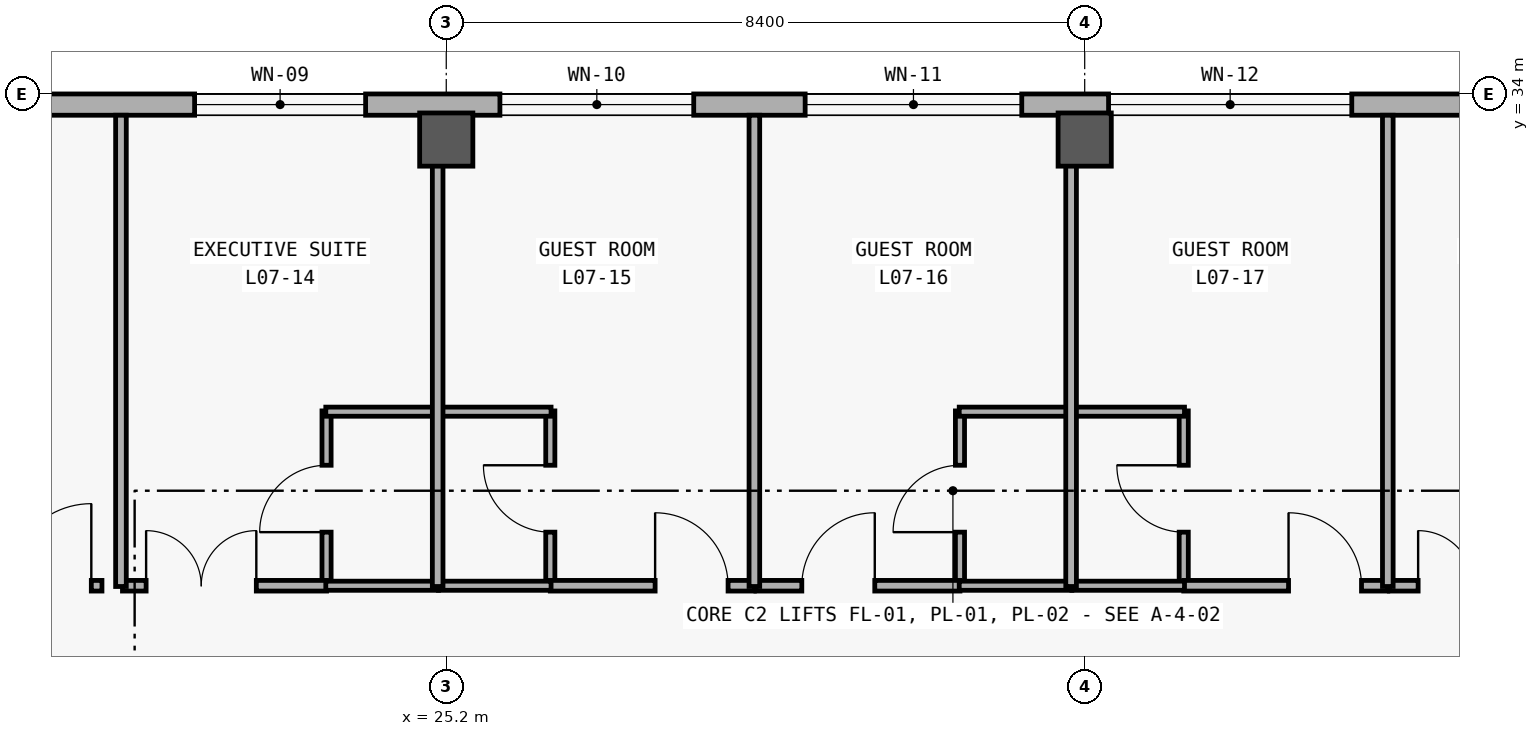
"""IFC4 building model, lengths in metres.
Left out: names, types, materials, properties, quantities, classifications, styles, units other than length and angle.
Written with IfcOpenShell. Run it as: python <this file> out.ifc"""

import sys

from ifc_helpers import new_model, si_unit, direction, frame, frame_2d, origin, origin_2d, place, context, subcontext, project, spatial, rectangle, extrude, element, fill, save


model = new_model("IFC4")
c1 = context("Model", 3, precision=1e-05, world=origin(), true_north=direction((0.0, 1.0)))
c2 = subcontext(c1, "Body", "Model", "MODEL_VIEW")
j1 = project(units=[si_unit("LENGTHUNIT", "METRE"), si_unit("PLANEANGLEUNIT", "RADIAN")], contexts=[c1])
p1 = place(None, origin())
s1 = spatial("IfcSite", under=j1, at=p1, CompositionType="ELEMENT")
p2 = place(p1, origin())
s2 = spatial("IfcBuilding", under=s1, at=p2, CompositionType="ELEMENT")
p3 = place(p2, frame((0.0, 0.0, 30.0)))
s3 = spatial("IfcBuildingStorey", under=s2, at=p3, CompositionType="ELEMENT", Elevation=30.0)
for number, where, z_axis, x_axis in (
    (1, (25.2, 33.4, 0.0), (0.0, 0.0, 1.0), (1.0, 0.0, 0.0)),
    (2, (33.6, 33.4, 0.0), (0.0, 0.0, 1.0), (1.0, 0.0, 0.0)),
):
    element("IfcColumn", number, at=place(p3, frame(where, z_axis=z_axis, x_axis=x_axis)), inside=s3, PredefinedType="COLUMN", context=c2, shape_type="SweptSolid", body=[
        extrude(rectangle(XDim=0.7, YDim=0.7, at=origin_2d()), origin(), (0.0, 0.0, 1.0), 3.6),
    ])
p4 = place(p3, frame((8.68, 33.86, 0.0), z_axis=(0.0, 0.0, 1.0), x_axis=(1.0, 0.0, 0.0)))
e3 = element("IfcWall", 3, at=p4, inside=s3, PredefinedType="SOLIDWALL", context=c2, shape_type="SweptSolid", body=[
    extrude(rectangle(XDim=66.64, YDim=0.28, at=frame_2d((33.32, 0.0))), origin(), (0.0, 0.0, 1.0), 3.34),
])
p5 = place(p4, frame((5.195, 0.0, 0.85)))
e4 = element("IfcOpeningElement", 4, at=p5, cuts=e3, PredefinedType="OPENING", context=c2, shape_type="SweptSolid", body=[
    extrude(rectangle(XDim=2.0, YDim=1.65, at=frame_2d((1.0, 0.825))), frame((0.0, 0.15, 0.0), z_axis=(0.0, -1.0, 0.0), x_axis=(1.0, 0.0, 0.0)), (0.0, 0.0, 1.0), 0.3),
])
p6 = place(p4, frame((13.209, 0.0, 0.85)))
e5 = element("IfcOpeningElement", 5, at=p6, cuts=e3, PredefinedType="OPENING", context=c2, shape_type="SweptSolid", body=[
    extrude(rectangle(XDim=2.25, YDim=1.75, at=frame_2d((1.125, 0.875))), frame((0.0, 0.15, 0.0), z_axis=(0.0, -1.0, 0.0), x_axis=(1.0, 0.0, 0.0)), (0.0, 0.0, 1.0), 0.3),
])
p7 = place(p4, frame((17.226, 0.0, 0.85)))
e6 = element("IfcOpeningElement", 6, at=p7, cuts=e3, PredefinedType="OPENING", context=c2, shape_type="SweptSolid", body=[
    extrude(rectangle(XDim=2.55, YDim=1.8, at=frame_2d((1.275, 0.9))), frame((0.0, 0.15, 0.0), z_axis=(0.0, -1.0, 0.0), x_axis=(1.0, 0.0, 0.0)), (0.0, 0.0, 1.0), 0.3),
])
p8 = place(p4, frame((21.242, 0.0, 0.85)))
e7 = element("IfcOpeningElement", 7, at=p8, cuts=e3, PredefinedType="OPENING", context=c2, shape_type="SweptSolid", body=[
    extrude(rectangle(XDim=2.85, YDim=1.85, at=frame_2d((1.425, 0.925))), frame((0.0, 0.15, 0.0), z_axis=(0.0, -1.0, 0.0), x_axis=(1.0, 0.0, 0.0)), (0.0, 0.0, 1.0), 0.3),
])
p9 = place(p4, frame((25.234, 0.0, 0.85)))
e8 = element("IfcOpeningElement", 8, at=p9, cuts=e3, PredefinedType="OPENING", context=c2, shape_type="SweptSolid", body=[
    extrude(rectangle(XDim=3.2, YDim=1.95, at=frame_2d((1.6, 0.975))), frame((0.0, 0.15, 0.0), z_axis=(0.0, -1.0, 0.0), x_axis=(1.0, 0.0, 0.0)), (0.0, 0.0, 1.0), 0.3),
])
p10 = place(p4, frame((30.302, 0.0, 0.85)))
e9 = element("IfcOpeningElement", 9, at=p10, cuts=e3, PredefinedType="OPENING", context=c2, shape_type="SweptSolid", body=[
    extrude(rectangle(XDim=1.4, YDim=1.6, at=frame_2d((0.7, 0.8))), frame((0.0, 0.15, 0.0), z_axis=(0.0, -1.0, 0.0), x_axis=(1.0, 0.0, 0.0)), (0.0, 0.0, 1.0), 0.3),
])
p11 = place(p4, frame((34.369, 0.0, 0.85)))
e10 = element("IfcOpeningElement", 10, at=p11, cuts=e3, PredefinedType="OPENING", context=c2, shape_type="SweptSolid", body=[
    extrude(rectangle(XDim=1.6, YDim=1.6, at=frame_2d((0.8, 0.8))), frame((0.0, 0.15, 0.0), z_axis=(0.0, -1.0, 0.0), x_axis=(1.0, 0.0, 0.0)), (0.0, 0.0, 1.0), 0.3),
])
p12 = place(p4, frame((38.435, 0.0, 0.85)))
e11 = element("IfcOpeningElement", 11, at=p12, cuts=e3, PredefinedType="OPENING", context=c2, shape_type="SweptSolid", body=[
    extrude(rectangle(XDim=1.8, YDim=1.6, at=frame_2d((0.9, 0.8))), frame((0.0, 0.15, 0.0), z_axis=(0.0, -1.0, 0.0), x_axis=(1.0, 0.0, 0.0)), (0.0, 0.0, 1.0), 0.3),
])
p13 = place(p4, frame((42.502, 0.0, 0.85)))
e12 = element("IfcOpeningElement", 12, at=p13, cuts=e3, PredefinedType="OPENING", context=c2, shape_type="SweptSolid", body=[
    extrude(rectangle(XDim=2.0, YDim=1.65, at=frame_2d((1.0, 0.825))), frame((0.0, 0.15, 0.0), z_axis=(0.0, -1.0, 0.0), x_axis=(1.0, 0.0, 0.0)), (0.0, 0.0, 1.0), 0.3),
])
p14 = place(p4, frame((46.569, 0.0, 0.85)))
e13 = element("IfcOpeningElement", 13, at=p14, cuts=e3, PredefinedType="OPENING", context=c2, shape_type="SweptSolid", body=[
    extrude(rectangle(XDim=2.2, YDim=1.65, at=frame_2d((1.1, 0.825))), frame((0.0, 0.15, 0.0), z_axis=(0.0, -1.0, 0.0), x_axis=(1.0, 0.0, 0.0)), (0.0, 0.0, 1.0), 0.3),
])
p15 = place(p4, frame((50.536, 0.0, 0.85)))
e14 = element("IfcOpeningElement", 14, at=p15, cuts=e3, PredefinedType="OPENING", context=c2, shape_type="SweptSolid", body=[
    extrude(rectangle(XDim=2.6, YDim=2.2, at=frame_2d((1.3, 1.1))), frame((0.0, 0.15, 0.0), z_axis=(0.0, -1.0, 0.0), x_axis=(1.0, 0.0, 0.0)), (0.0, 0.0, 1.0), 0.3),
])
p16 = place(p4, frame((54.453, 0.0, 0.85)))
e15 = element("IfcOpeningElement", 15, at=p16, cuts=e3, PredefinedType="OPENING", context=c2, shape_type="SweptSolid", body=[
    extrude(rectangle(XDim=3.1, YDim=2.2, at=frame_2d((1.55, 1.1))), frame((0.0, 0.15, 0.0), z_axis=(0.0, -1.0, 0.0), x_axis=(1.0, 0.0, 0.0)), (0.0, 0.0, 1.0), 0.3),
])
p17 = place(p4, frame((59.545, 0.0, 0.85)))
e16 = element("IfcOpeningElement", 16, at=p17, cuts=e3, PredefinedType="OPENING", context=c2, shape_type="SweptSolid", body=[
    extrude(rectangle(XDim=1.25, YDim=1.45, at=frame_2d((0.625, 0.725))), frame((0.0, 0.15, 0.0), z_axis=(0.0, -1.0, 0.0), x_axis=(1.0, 0.0, 0.0)), (0.0, 0.0, 1.0), 0.3),
])
p18 = place(p4, frame((63.662, 0.0, 0.85)))
e17 = element("IfcOpeningElement", 17, at=p18, cuts=e3, PredefinedType="OPENING", context=c2, shape_type="SweptSolid", body=[
    extrude(rectangle(XDim=1.35, YDim=1.55, at=frame_2d((0.675, 0.775))), frame((0.0, 0.15, 0.0), z_axis=(0.0, -1.0, 0.0), x_axis=(1.0, 0.0, 0.0)), (0.0, 0.0, 1.0), 0.3),
])
p19 = place(p3, frame((23.625, 27.52, 0.0), z_axis=(0.0, 0.0, 1.0), x_axis=(0.0, 1.0, 0.0)))
e18 = element("IfcWall", 18, at=p19, inside=s3, PredefinedType="PARTITIONING", context=c2, shape_type="SweptSolid", body=[
    extrude(rectangle(XDim=2.31, YDim=0.12, at=frame_2d((1.155, 0.0))), origin(), (0.0, 0.0, 1.0), 2.48),
])
p20 = place(p19, frame((0.715, 0.0, 0.0)))
e19 = element("IfcOpeningElement", 19, at=p20, cuts=e18, PredefinedType="OPENING", context=c2, shape_type="SweptSolid", body=[
    extrude(rectangle(XDim=0.88, YDim=2.15, at=frame_2d((0.44, 1.075))), frame((0.0, 0.07, 0.0), z_axis=(0.0, -1.0, 0.0), x_axis=(1.0, 0.0, 0.0)), (0.0, 0.0, 1.0), 0.14),
])
p21 = place(p3, frame((26.569, 27.52, 0.0), z_axis=(0.0, 0.0, 1.0), x_axis=(0.0, 1.0, 0.0)))
e20 = element("IfcWall", 20, at=p21, inside=s3, PredefinedType="PARTITIONING", context=c2, shape_type="SweptSolid", body=[
    extrude(rectangle(XDim=2.31, YDim=0.12, at=frame_2d((1.155, 0.0))), origin(), (0.0, 0.0, 1.0), 2.48),
])
p22 = place(p21, frame((0.715, 0.0, 0.0)))
e21 = element("IfcOpeningElement", 21, at=p22, cuts=e20, PredefinedType="OPENING", context=c2, shape_type="SweptSolid", body=[
    extrude(rectangle(XDim=0.88, YDim=2.15, at=frame_2d((0.44, 1.075))), frame((0.0, 0.07, 0.0), z_axis=(0.0, -1.0, 0.0), x_axis=(1.0, 0.0, 0.0)), (0.0, 0.0, 1.0), 0.14),
])
p23 = place(p3, frame((31.959, 27.52, 0.0), z_axis=(0.0, 0.0, 1.0), x_axis=(0.0, 1.0, 0.0)))
e22 = element("IfcWall", 22, at=p23, inside=s3, PredefinedType="PARTITIONING", context=c2, shape_type="SweptSolid", body=[
    extrude(rectangle(XDim=2.31, YDim=0.12, at=frame_2d((1.155, 0.0))), origin(), (0.0, 0.0, 1.0), 2.48),
])
p24 = place(p23, frame((0.715, 0.0, 0.0)))
e23 = element("IfcOpeningElement", 23, at=p24, cuts=e22, PredefinedType="OPENING", context=c2, shape_type="SweptSolid", body=[
    extrude(rectangle(XDim=0.88, YDim=2.15, at=frame_2d((0.44, 1.075))), frame((0.0, 0.07, 0.0), z_axis=(0.0, -1.0, 0.0), x_axis=(1.0, 0.0, 0.0)), (0.0, 0.0, 1.0), 0.14),
])
p25 = place(p3, frame((34.903, 27.52, 0.0), z_axis=(0.0, 0.0, 1.0), x_axis=(0.0, 1.0, 0.0)))
e24 = element("IfcWall", 24, at=p25, inside=s3, PredefinedType="PARTITIONING", context=c2, shape_type="SweptSolid", body=[
    extrude(rectangle(XDim=2.31, YDim=0.12, at=frame_2d((1.155, 0.0))), origin(), (0.0, 0.0, 1.0), 2.48),
])
p26 = place(p25, frame((0.715, 0.0, 0.0)))
e25 = element("IfcOpeningElement", 25, at=p26, cuts=e24, PredefinedType="OPENING", context=c2, shape_type="SweptSolid", body=[
    extrude(rectangle(XDim=0.88, YDim=2.15, at=frame_2d((0.44, 1.075))), frame((0.0, 0.07, 0.0), z_axis=(0.0, -1.0, 0.0), x_axis=(1.0, 0.0, 0.0)), (0.0, 0.0, 1.0), 0.14),
])
p27 = place(p3, frame((16.96, 27.53, 0.0), z_axis=(0.0, 0.0, 1.0), x_axis=(1.0, 0.0, 0.0)))
e26 = element("IfcWall", 26, at=p27, inside=s3, PredefinedType="PARTITIONING", context=c2, shape_type="SweptSolid", body=[
    extrude(rectangle(XDim=3.71, YDim=0.14, at=frame_2d((1.855, 0.0))), origin(), (0.0, 0.0, 1.0), 2.48),
])
p28 = place(p27, frame((2.49, 0.0, 0.0)))
e27 = element("IfcOpeningElement", 27, at=p28, cuts=e26, PredefinedType="OPENING", context=c2, shape_type="SweptSolid", body=[
    extrude(rectangle(XDim=1.08, YDim=2.25, at=frame_2d((0.54, 1.125))), frame((0.0, 0.08, 0.0), z_axis=(0.0, -1.0, 0.0), x_axis=(1.0, 0.0, 0.0)), (0.0, 0.0, 1.0), 0.16),
])
p29 = place(p3, frame((20.94, 27.53, 0.0), z_axis=(0.0, 0.0, 1.0), x_axis=(1.0, 0.0, 0.0)))
e28 = element("IfcWall", 28, at=p29, inside=s3, PredefinedType="PARTITIONING", context=c2, shape_type="SweptSolid", body=[
    extrude(rectangle(XDim=2.685, YDim=0.14, at=frame_2d((1.343, 0.0))), origin(), (0.0, 0.0, 1.0), 2.48),
])
p30 = place(p29, frame((0.311, 0.0, 0.0)))
e29 = element("IfcOpeningElement", 29, at=p30, cuts=e28, PredefinedType="OPENING", context=c2, shape_type="SweptSolid", body=[
    extrude(rectangle(XDim=1.45, YDim=2.3, at=frame_2d((0.725, 1.15))), frame((0.0, 0.08, 0.0), z_axis=(0.0, -1.0, 0.0), x_axis=(1.0, 0.0, 0.0)), (0.0, 0.0, 1.0), 0.16),
])
p31 = place(p3, frame((26.569, 27.53, 0.0), z_axis=(0.0, 0.0, 1.0), x_axis=(1.0, 0.0, 0.0)))
e30 = element("IfcWall", 30, at=p31, inside=s3, PredefinedType="PARTITIONING", context=c2, shape_type="SweptSolid", body=[
    extrude(rectangle(XDim=2.685, YDim=0.14, at=frame_2d((1.342, 0.0))), origin(), (0.0, 0.0, 1.0), 2.48),
])
p32 = place(p31, frame((1.379, 0.0, 0.0)))
e31 = element("IfcOpeningElement", 31, at=p32, cuts=e30, PredefinedType="OPENING", context=c2, shape_type="SweptSolid", body=[
    extrude(rectangle(XDim=0.96, YDim=2.25, at=frame_2d((0.48, 1.125))), frame((0.0, 0.08, 0.0), z_axis=(0.0, -1.0, 0.0), x_axis=(1.0, 0.0, 0.0)), (0.0, 0.0, 1.0), 0.16),
])
p33 = place(p3, frame((29.274, 27.53, 0.0), z_axis=(0.0, 0.0, 1.0), x_axis=(1.0, 0.0, 0.0)))
e32 = element("IfcWall", 32, at=p33, inside=s3, PredefinedType="PARTITIONING", context=c2, shape_type="SweptSolid", body=[
    extrude(rectangle(XDim=2.685, YDim=0.14, at=frame_2d((1.343, 0.0))), origin(), (0.0, 0.0, 1.0), 2.48),
])
p34 = place(p33, frame((0.604, 0.0, 0.0)))
e33 = element("IfcOpeningElement", 33, at=p34, cuts=e32, PredefinedType="OPENING", context=c2, shape_type="SweptSolid", body=[
    extrude(rectangle(XDim=0.96, YDim=2.25, at=frame_2d((0.48, 1.125))), frame((0.0, 0.08, 0.0), z_axis=(0.0, -1.0, 0.0), x_axis=(1.0, 0.0, 0.0)), (0.0, 0.0, 1.0), 0.16),
])
p35 = place(p3, frame((34.903, 27.53, 0.0), z_axis=(0.0, 0.0, 1.0), x_axis=(1.0, 0.0, 0.0)))
e34 = element("IfcWall", 34, at=p35, inside=s3, PredefinedType="PARTITIONING", context=c2, shape_type="SweptSolid", body=[
    extrude(rectangle(XDim=2.685, YDim=0.14, at=frame_2d((1.342, 0.0))), origin(), (0.0, 0.0, 1.0), 2.48),
])
p36 = place(p35, frame((1.379, 0.0, 0.0)))
e35 = element("IfcOpeningElement", 35, at=p36, cuts=e34, PredefinedType="OPENING", context=c2, shape_type="SweptSolid", body=[
    extrude(rectangle(XDim=0.96, YDim=2.25, at=frame_2d((0.48, 1.125))), frame((0.0, 0.08, 0.0), z_axis=(0.0, -1.0, 0.0), x_axis=(1.0, 0.0, 0.0)), (0.0, 0.0, 1.0), 0.16),
])
p37 = place(p3, frame((37.608, 27.53, 0.0), z_axis=(0.0, 0.0, 1.0), x_axis=(1.0, 0.0, 0.0)))
e36 = element("IfcWall", 36, at=p37, inside=s3, PredefinedType="PARTITIONING", context=c2, shape_type="SweptSolid", body=[
    extrude(rectangle(XDim=2.685, YDim=0.14, at=frame_2d((1.343, 0.0))), origin(), (0.0, 0.0, 1.0), 2.48),
])
p38 = place(p37, frame((0.379, 0.0, 0.0)))
e37 = element("IfcOpeningElement", 37, at=p38, cuts=e36, PredefinedType="OPENING", context=c2, shape_type="SweptSolid", body=[
    extrude(rectangle(XDim=1.45, YDim=2.3, at=frame_2d((0.725, 1.15))), frame((0.0, 0.08, 0.0), z_axis=(0.0, -1.0, 0.0), x_axis=(1.0, 0.0, 0.0)), (0.0, 0.0, 1.0), 0.16),
])
for number, where, z_axis, x_axis in (
    (38, (23.615, 27.53, 0.0), (0.0, 0.0, 1.0), (1.0, 0.0, 0.0)),
    (39, (23.615, 29.82, 0.0), (0.0, 0.0, 1.0), (1.0, 0.0, 0.0)),
):
    element("IfcWall", number, at=place(p3, frame(where, z_axis=z_axis, x_axis=x_axis)), inside=s3, PredefinedType="PARTITIONING", context=c2, shape_type="SweptSolid", body=[
        extrude(rectangle(XDim=1.482, YDim=0.12, at=frame_2d((0.741, 0.0))), origin(), (0.0, 0.0, 1.0), 2.48),
    ])
for number, where, z_axis, x_axis in (
    (40, (25.097, 27.53, 0.0), (0.0, 0.0, 1.0), (1.0, 0.0, 0.0)),
    (41, (25.097, 29.82, 0.0), (0.0, 0.0, 1.0), (1.0, 0.0, 0.0)),
):
    element("IfcWall", number, at=place(p3, frame(where, z_axis=z_axis, x_axis=x_axis)), inside=s3, PredefinedType="PARTITIONING", context=c2, shape_type="SweptSolid", body=[
        extrude(rectangle(XDim=1.482, YDim=0.12, at=frame_2d((0.741, 0.0))), origin(), (0.0, 0.0, 1.0), 2.48),
    ])
for number, where, z_axis, x_axis in (
    (42, (31.949, 27.53, 0.0), (0.0, 0.0, 1.0), (1.0, 0.0, 0.0)),
    (43, (31.949, 29.82, 0.0), (0.0, 0.0, 1.0), (1.0, 0.0, 0.0)),
):
    element("IfcWall", number, at=place(p3, frame(where, z_axis=z_axis, x_axis=x_axis)), inside=s3, PredefinedType="PARTITIONING", context=c2, shape_type="SweptSolid", body=[
        extrude(rectangle(XDim=1.482, YDim=0.12, at=frame_2d((0.741, 0.0))), origin(), (0.0, 0.0, 1.0), 2.48),
    ])
for number, where, z_axis, x_axis in (
    (44, (33.431, 27.53, 0.0), (0.0, 0.0, 1.0), (1.0, 0.0, 0.0)),
    (45, (33.431, 29.82, 0.0), (0.0, 0.0, 1.0), (1.0, 0.0, 0.0)),
):
    element("IfcWall", number, at=place(p3, frame(where, z_axis=z_axis, x_axis=x_axis)), inside=s3, PredefinedType="PARTITIONING", context=c2, shape_type="SweptSolid", body=[
        extrude(rectangle(XDim=1.482, YDim=0.12, at=frame_2d((0.741, 0.0))), origin(), (0.0, 0.0, 1.0), 2.48),
    ])
for number, where, z_axis, x_axis in (
    (46, (20.92, 27.52, 0.0), (0.0, 0.0, 1.0), (0.0, 1.0, 0.0)),
    (47, (25.087, 27.52, 0.0), (0.0, 0.0, 1.0), (0.0, 1.0, 0.0)),
    (48, (29.254, 27.52, 0.0), (0.0, 0.0, 1.0), (0.0, 1.0, 0.0)),
    (49, (33.421, 27.52, 0.0), (0.0, 0.0, 1.0), (0.0, 1.0, 0.0)),
    (50, (37.588, 27.52, 0.0), (0.0, 0.0, 1.0), (0.0, 1.0, 0.0)),
):
    element("IfcWall", number, at=place(p3, frame(where, z_axis=z_axis, x_axis=x_axis)), inside=s3, PredefinedType="PARTITIONING", context=c2, shape_type="SweptSolid", body=[
        extrude(rectangle(XDim=6.2, YDim=0.14, at=frame_2d((3.1, 0.0))), origin(), (0.0, 0.0, 1.0), 2.48),
    ])
p39 = place(p6, origin())
e51 = element("IfcWindow", 51, at=p39, inside=s3, PartitioningType="SINGLE_PANEL", PredefinedType="WINDOW", context=c2, shape_type="SweptSolid", body=[
    extrude(rectangle(XDim=2.25, YDim=1.75, at=frame_2d((1.125, 0.875))), frame((0.0, 0.03, 0.0), z_axis=(0.0, -1.0, 0.0), x_axis=(1.0, 0.0, 0.0)), (0.0, 0.0, 1.0), 0.06),
])
fill(e5, e51)
p40 = place(p7, origin())
e52 = element("IfcWindow", 52, at=p40, inside=s3, PartitioningType="SINGLE_PANEL", PredefinedType="WINDOW", context=c2, shape_type="SweptSolid", body=[
    extrude(rectangle(XDim=2.55, YDim=1.8, at=frame_2d((1.275, 0.9))), frame((0.0, 0.03, 0.0), z_axis=(0.0, -1.0, 0.0), x_axis=(1.0, 0.0, 0.0)), (0.0, 0.0, 1.0), 0.06),
])
fill(e6, e52)
p41 = place(p8, origin())
e53 = element("IfcWindow", 53, at=p41, inside=s3, PartitioningType="SINGLE_PANEL", PredefinedType="WINDOW", context=c2, shape_type="SweptSolid", body=[
    extrude(rectangle(XDim=2.85, YDim=1.85, at=frame_2d((1.425, 0.925))), frame((0.0, 0.03, 0.0), z_axis=(0.0, -1.0, 0.0), x_axis=(1.0, 0.0, 0.0)), (0.0, 0.0, 1.0), 0.06),
])
fill(e7, e53)
p42 = place(p9, origin())
e54 = element("IfcWindow", 54, at=p42, inside=s3, PartitioningType="SINGLE_PANEL", PredefinedType="WINDOW", context=c2, shape_type="SweptSolid", body=[
    extrude(rectangle(XDim=3.2, YDim=1.95, at=frame_2d((1.6, 0.975))), frame((0.0, 0.03, 0.0), z_axis=(0.0, -1.0, 0.0), x_axis=(1.0, 0.0, 0.0)), (0.0, 0.0, 1.0), 0.06),
])
fill(e8, e54)
p43 = place(p20, origin())
e55 = element("IfcDoor", 55, at=p43, inside=s3, OperationType="SINGLE_SWING_LEFT", PredefinedType="DOOR", context=c2, shape_type="SweptSolid", body=[
    extrude(rectangle(XDim=0.88, YDim=2.15, at=frame_2d((0.44, 1.075))), frame((0.0, 0.025, 0.0), z_axis=(0.0, -1.0, 0.0), x_axis=(1.0, 0.0, 0.0)), (0.0, 0.0, 1.0), 0.05),
])
fill(e19, e55)
p44 = place(p22, origin())
e56 = element("IfcDoor", 56, at=p44, inside=s3, OperationType="SINGLE_SWING_RIGHT", PredefinedType="DOOR", context=c2, shape_type="SweptSolid", body=[
    extrude(rectangle(XDim=0.88, YDim=2.15, at=frame_2d((0.44, 1.075))), frame((0.0, 0.025, 0.0), z_axis=(0.0, -1.0, 0.0), x_axis=(1.0, 0.0, 0.0)), (0.0, 0.0, 1.0), 0.05),
])
fill(e21, e56)
p45 = place(p24, origin())
e57 = element("IfcDoor", 57, at=p45, inside=s3, OperationType="SINGLE_SWING_LEFT", PredefinedType="DOOR", context=c2, shape_type="SweptSolid", body=[
    extrude(rectangle(XDim=0.88, YDim=2.15, at=frame_2d((0.44, 1.075))), frame((0.0, 0.025, 0.0), z_axis=(0.0, -1.0, 0.0), x_axis=(1.0, 0.0, 0.0)), (0.0, 0.0, 1.0), 0.05),
])
fill(e23, e57)
p46 = place(p26, origin())
e58 = element("IfcDoor", 58, at=p46, inside=s3, OperationType="SINGLE_SWING_RIGHT", PredefinedType="DOOR", context=c2, shape_type="SweptSolid", body=[
    extrude(rectangle(XDim=0.88, YDim=2.15, at=frame_2d((0.44, 1.075))), frame((0.0, 0.025, 0.0), z_axis=(0.0, -1.0, 0.0), x_axis=(1.0, 0.0, 0.0)), (0.0, 0.0, 1.0), 0.05),
])
fill(e25, e58)
p47 = place(p28, origin())
e59 = element("IfcDoor", 59, at=p47, inside=s3, OperationType="SINGLE_SWING_RIGHT", PredefinedType="DOOR", context=c2, shape_type="SweptSolid", body=[
    extrude(rectangle(XDim=1.08, YDim=2.25, at=frame_2d((0.54, 1.125))), frame((0.0, 0.025, 0.0), z_axis=(0.0, -1.0, 0.0), x_axis=(1.0, 0.0, 0.0)), (0.0, 0.0, 1.0), 0.05),
])
fill(e27, e59)
p48 = place(p30, origin())
e60 = element("IfcDoor", 60, at=p48, inside=s3, OperationType="DOUBLE_DOOR_SINGLE_SWING", PredefinedType="DOOR", context=c2, shape_type="SweptSolid", body=[
    extrude(rectangle(XDim=1.45, YDim=2.3, at=frame_2d((0.725, 1.15))), frame((0.0, 0.025, 0.0), z_axis=(0.0, -1.0, 0.0), x_axis=(1.0, 0.0, 0.0)), (0.0, 0.0, 1.0), 0.05),
])
fill(e29, e60)
p49 = place(p32, origin())
e61 = element("IfcDoor", 61, at=p49, inside=s3, OperationType="SINGLE_SWING_LEFT", PredefinedType="DOOR", context=c2, shape_type="SweptSolid", body=[
    extrude(rectangle(XDim=0.96, YDim=2.25, at=frame_2d((0.48, 1.125))), frame((0.0, 0.025, 0.0), z_axis=(0.0, -1.0, 0.0), x_axis=(1.0, 0.0, 0.0)), (0.0, 0.0, 1.0), 0.05),
])
fill(e31, e61)
p50 = place(p34, origin())
e62 = element("IfcDoor", 62, at=p50, inside=s3, OperationType="SINGLE_SWING_RIGHT", PredefinedType="DOOR", context=c2, shape_type="SweptSolid", body=[
    extrude(rectangle(XDim=0.96, YDim=2.25, at=frame_2d((0.48, 1.125))), frame((0.0, 0.025, 0.0), z_axis=(0.0, -1.0, 0.0), x_axis=(1.0, 0.0, 0.0)), (0.0, 0.0, 1.0), 0.05),
])
fill(e33, e62)
p51 = place(p36, origin())
e63 = element("IfcDoor", 63, at=p51, inside=s3, OperationType="SINGLE_SWING_LEFT", PredefinedType="DOOR", context=c2, shape_type="SweptSolid", body=[
    extrude(rectangle(XDim=0.96, YDim=2.25, at=frame_2d((0.48, 1.125))), frame((0.0, 0.025, 0.0), z_axis=(0.0, -1.0, 0.0), x_axis=(1.0, 0.0, 0.0)), (0.0, 0.0, 1.0), 0.05),
])
fill(e35, e63)
p52 = place(p38, origin())
e64 = element("IfcDoor", 64, at=p52, inside=s3, OperationType="DOUBLE_DOOR_SINGLE_SWING", PredefinedType="DOOR", context=c2, shape_type="SweptSolid", body=[
    extrude(rectangle(XDim=1.45, YDim=2.3, at=frame_2d((0.725, 1.15))), frame((0.0, 0.025, 0.0), z_axis=(0.0, -1.0, 0.0), x_axis=(1.0, 0.0, 0.0)), (0.0, 0.0, 1.0), 0.05),
])
fill(e37, e64)
save(model, sys.argv[1])
